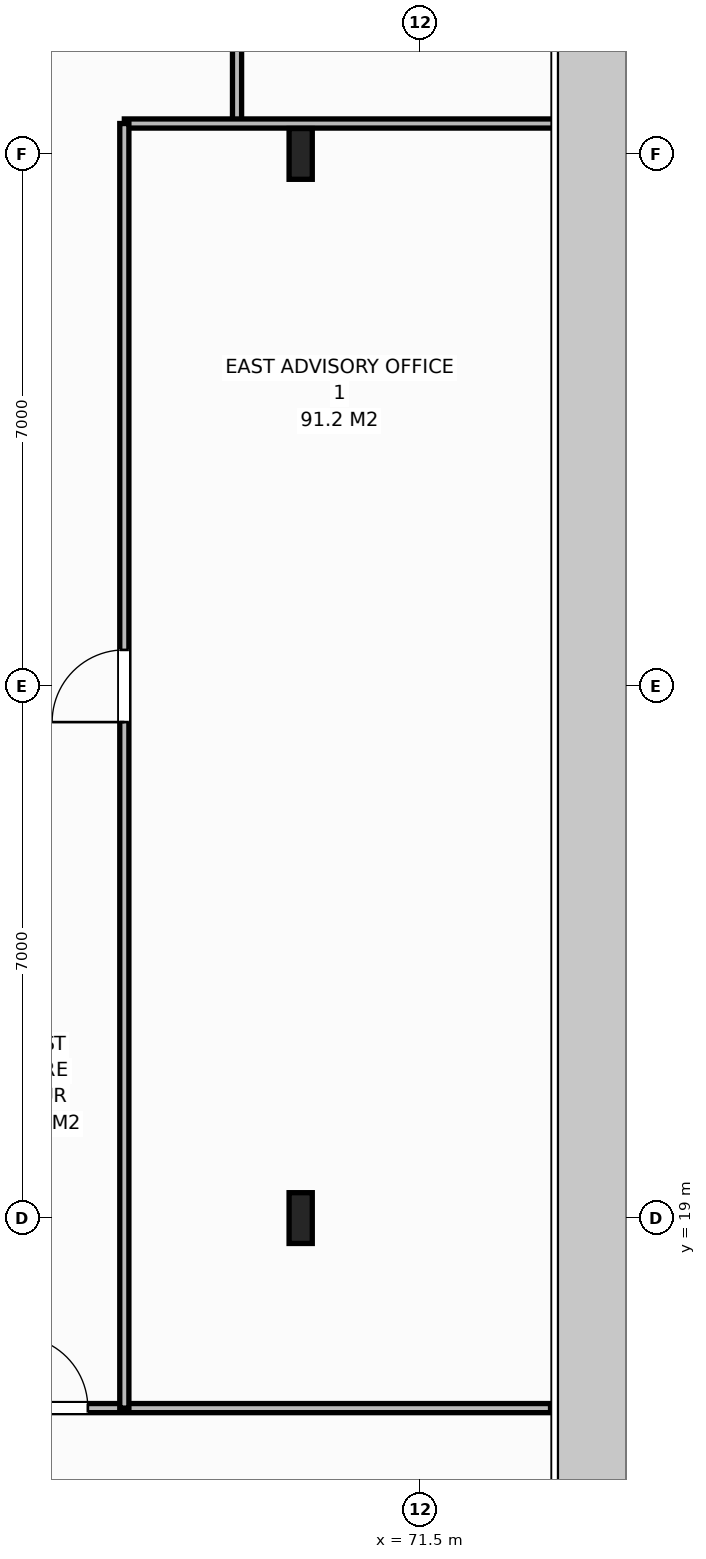
"""IFC4 building model, lengths in metres.
Left out: names, types, materials, properties, quantities, classifications, styles, units other than length and angle.
Written with IfcOpenShell. Run it as: python <this file> out.ifc"""

import sys

from ifc_helpers import new_model, si_unit, direction, frame, frame_2d, origin, origin_2d, place, context, subcontext, project, spatial, rectangle, i_section, extrude, element, fill, save


model = new_model("IFC4")
c1 = context("Model", 3, precision=1e-05, world=origin(), true_north=direction((0.0, 1.0)))
c2 = subcontext(c1, "Body", "Model", "MODEL_VIEW")
j1 = project(units=[si_unit("LENGTHUNIT", "METRE"), si_unit("PLANEANGLEUNIT", "RADIAN")], contexts=[c1])
p1 = place(None, origin())
s1 = spatial("IfcSite", under=j1, at=p1, CompositionType="ELEMENT")
p2 = place(p1, origin())
s2 = spatial("IfcBuilding", under=s1, at=p2, CompositionType="ELEMENT")
p3 = place(p2, frame((0.0, 0.0, 290.4)))
s3 = spatial("IfcBuildingStorey", under=s2, at=p3, CompositionType="ELEMENT", Elevation=290.4)
for number, where, z_axis, x_axis in (
    (1, (69.92, 19.0, 0.0), (0.0, 0.0, 1.0), (1.0, 0.0, 0.0)),
    (2, (69.92, 33.0, 0.0), (0.0, 0.0, 1.0), (1.0, 0.0, 0.0)),
):
    element("IfcColumn", number, at=place(p3, frame(where, z_axis=z_axis, x_axis=x_axis)), inside=s3, PredefinedType="COLUMN", context=c2, shape_type="SweptSolid", body=[
        extrude(i_section(OverallWidth=0.305, OverallDepth=0.668, WebThickness=0.021, FlangeThickness=0.04, at=origin_2d()), origin(), (0.0, 0.0, 1.0), 4.0),
    ])
p4 = place(p3, frame((69.083, 33.4, 0.0), z_axis=(0.0, 0.0, 1.0), x_axis=(0.0, 1.0, 0.0)))
e3 = element("IfcWall", 3, at=p4, inside=s3, PredefinedType="PARTITIONING", context=c2, shape_type="SweptSolid", body=[
    extrude(rectangle(XDim=2.1, YDim=0.12, at=frame_2d((1.05, 0.0))), origin(), (0.0, 0.0, 1.0), 3.788),
])
p5 = place(p3, frame((64.86, 16.5, 0.0), z_axis=(0.0, 0.0, 1.0), x_axis=(1.0, 0.0, 0.0)))
e4 = element("IfcWall", 4, at=p5, inside=s3, PredefinedType="PARTITIONING", context=c2, shape_type="SweptSolid", body=[
    extrude(rectangle(XDim=8.347, YDim=0.12, at=frame_2d((4.174, 0.0))), origin(), (0.0, 0.0, 1.0), 3.788),
])
p6 = place(p5, frame((1.31, 0.0, 0.0)))
e5 = element("IfcOpeningElement", 5, at=p6, cuts=e4, PredefinedType="OPENING", context=c2, shape_type="SweptSolid", body=[
    extrude(rectangle(XDim=0.95, YDim=2.15, at=frame_2d((0.475, 1.075))), frame((0.0, 0.07, 0.0), z_axis=(0.0, -1.0, 0.0), x_axis=(1.0, 0.0, 0.0)), (0.0, 0.0, 1.0), 0.14),
])
p7 = place(p3, frame((67.6, 33.4, 0.0), z_axis=(0.0, 0.0, 1.0), x_axis=(1.0, 0.0, 0.0)))
e6 = element("IfcWall", 6, at=p7, inside=s3, PredefinedType="PARTITIONING", context=c2, shape_type="SweptSolid", body=[
    extrude(rectangle(XDim=5.767, YDim=0.12, at=frame_2d((2.884, 0.0))), origin(), (0.0, 0.0, 1.0), 3.788),
])
p8 = place(p3, frame((67.6, 16.5, 0.0), z_axis=(0.0, 0.0, 1.0), x_axis=(0.0, 1.0, 0.0)))
e7 = element("IfcWall", 7, at=p8, inside=s3, PredefinedType="PARTITIONING", context=c2, shape_type="SweptSolid", body=[
    extrude(rectangle(XDim=16.9, YDim=0.12, at=frame_2d((8.45, 0.0))), origin(), (0.0, 0.0, 1.0), 3.788),
])
p9 = place(p8, frame((9.025, 0.0, 0.0)))
e8 = element("IfcOpeningElement", 8, at=p9, cuts=e7, PredefinedType="OPENING", context=c2, shape_type="SweptSolid", body=[
    extrude(rectangle(XDim=0.95, YDim=2.15, at=frame_2d((0.475, 1.075))), frame((0.0, 0.07, 0.0), z_axis=(0.0, -1.0, 0.0), x_axis=(1.0, 0.0, 0.0)), (0.0, 0.0, 1.0), 0.14),
])
p10 = place(p6, origin())
e9 = element("IfcDoor", 9, at=p10, inside=s3, OperationType="SINGLE_SWING_LEFT", PredefinedType="DOOR", context=c2, shape_type="SweptSolid", body=[
    extrude(rectangle(XDim=0.95, YDim=2.15, at=frame_2d((0.475, 1.075))), frame((0.0, 0.025, 0.0), z_axis=(0.0, -1.0, 0.0), x_axis=(1.0, 0.0, 0.0)), (0.0, 0.0, 1.0), 0.05),
])
fill(e5, e9)
p11 = place(p9, origin())
e10 = element("IfcDoor", 10, at=p11, inside=s3, OperationType="SINGLE_SWING_LEFT", PredefinedType="DOOR", context=c2, shape_type="SweptSolid", body=[
    extrude(rectangle(XDim=0.95, YDim=2.15, at=frame_2d((0.475, 1.075))), frame((0.0, 0.025, 0.0), z_axis=(0.0, -1.0, 0.0), x_axis=(1.0, 0.0, 0.0)), (0.0, 0.0, 1.0), 0.05),
])
fill(e8, e10)
save(model, sys.argv[1])
